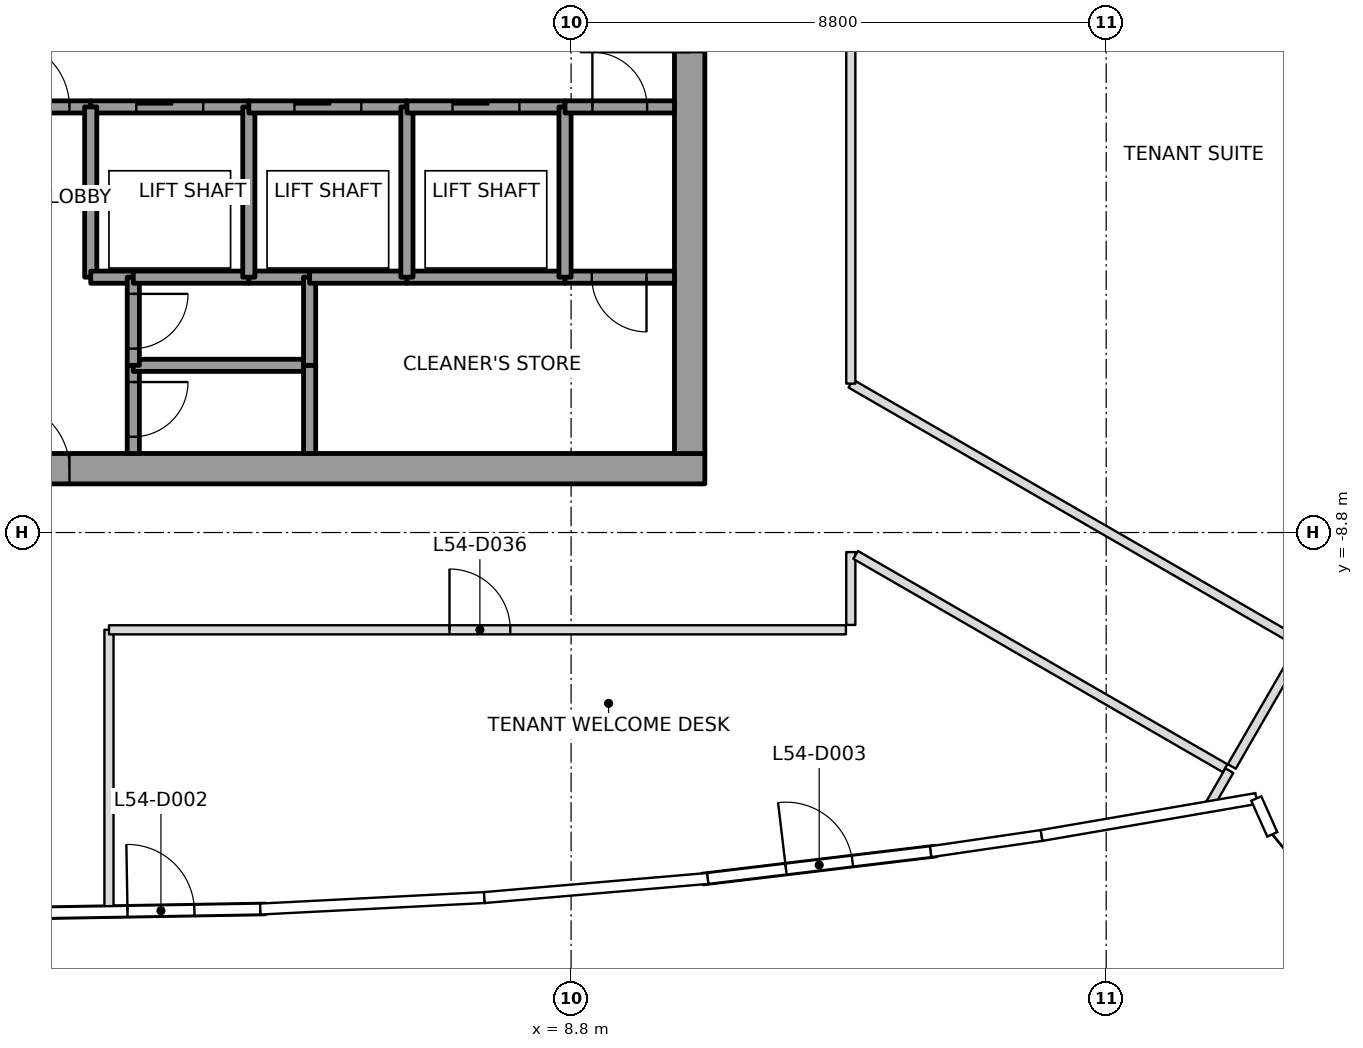
"""IFC4 building model, lengths in metres.
Left out: names, types, materials, properties, quantities, classifications, styles, units other than length and angle.
Written with IfcOpenShell. Run it as: python <this file> out.ifc"""

import sys

from ifc_helpers import new_model, si_unit, direction, frame, frame_2d, origin, place, context, subcontext, project, spatial, rectangle, extrude, element, fill, save


model = new_model("IFC4")
c1 = context("Model", 3, precision=1e-05, world=origin(), true_north=direction((0.0, 1.0)))
c2 = subcontext(c1, "Body", "Model", "MODEL_VIEW")
j1 = project(units=[si_unit("LENGTHUNIT", "METRE"), si_unit("PLANEANGLEUNIT", "RADIAN")], contexts=[c1])
p1 = place(None, origin())
s1 = spatial("IfcSite", under=j1, at=p1, CompositionType="ELEMENT")
p2 = place(p1, origin())
s2 = spatial("IfcBuilding", under=s1, at=p2, CompositionType="ELEMENT")
p3 = place(p2, frame((0.0, 0.0, 243.0)))
s3 = spatial("IfcBuildingStorey", under=s2, at=p3, CompositionType="ELEMENT", Elevation=243.0)
p4 = place(p3, frame((-11.0, -7.75, 0.0), z_axis=(0.0, 0.0, 1.0), x_axis=(1.0, 0.0, 0.0)))
e1 = element("IfcWall", 1, at=p4, inside=s3, PredefinedType="SHEAR", context=c2, shape_type="SweptSolid", body=[
    extrude(rectangle(XDim=22.0, YDim=0.5, at=frame_2d((11.0, 0.0))), origin(), (0.0, 0.0, 1.0), 4.0),
])
p5 = place(p4, frame((10.45, 0.0, 0.0)))
e2 = element("IfcOpeningElement", 2, at=p5, cuts=e1, PredefinedType="OPENING", context=c2, shape_type="SweptSolid", body=[
    extrude(rectangle(XDim=1.1, YDim=2.1, at=frame_2d((0.55, 1.05))), frame((0.0, 0.25, 0.0), z_axis=(0.0, -1.0, 0.0), x_axis=(1.0, 0.0, 0.0)), (0.0, 0.0, 1.0), 0.5),
])
p6 = place(p3, frame((10.75, -7.5, 0.0), z_axis=(0.0, 0.0, 1.0), x_axis=(0.0, 1.0, 0.0)))
e3 = element("IfcWall", 3, at=p6, inside=s3, PredefinedType="SHEAR", context=c2, shape_type="SweptSolid", body=[
    extrude(rectangle(XDim=15.0, YDim=0.5, at=frame_2d((7.5, 0.0))), origin(), (0.0, 0.0, 1.0), 4.0),
])
p7 = place(p6, frame((6.6, 0.0, 0.0)))
e4 = element("IfcOpeningElement", 4, at=p7, cuts=e3, PredefinedType="OPENING", context=c2, shape_type="SweptSolid", body=[
    extrude(rectangle(XDim=1.8, YDim=2.1, at=frame_2d((0.9, 1.05))), frame((0.0, 0.25, 0.0), z_axis=(0.0, -1.0, 0.0), x_axis=(1.0, 0.0, 0.0)), (0.0, 0.0, 1.0), 0.5),
])
p8 = place(p3, frame((-0.09, -15.057, 0.0), z_axis=(0.0, 0.0, 1.0), x_axis=(0.999853809474, 0.017098528577, 0.0)))
e5 = element("IfcWall", 5, at=p8, inside=s3, PredefinedType="SOLIDWALL", context=c2, shape_type="SweptSolid", body=[
    extrude(rectangle(XDim=3.869, YDim=0.2, at=frame_2d((1.935, 0.0))), origin(), (0.0, 0.0, 1.0), 3.317),
])
p9 = place(p8, frame((1.595, 0.0, 0.0)))
e6 = element("IfcOpeningElement", 6, at=p9, cuts=e5, PredefinedType="OPENING", context=c2, shape_type="SweptSolid", body=[
    extrude(rectangle(XDim=1.1, YDim=2.1, at=frame_2d((0.55, 1.05))), frame((0.0, 0.1, 0.0), z_axis=(0.0, -1.0, 0.0), x_axis=(1.0, 0.0, 0.0)), (0.0, 0.0, 1.0), 0.2),
])
p10 = place(p3, frame((10.96, -14.5, 0.0), z_axis=(0.0, 0.0, 1.0), x_axis=(0.992871762076, 0.119187516431, 0.0)))
e7 = element("IfcWall", 7, at=p10, inside=s3, PredefinedType="SOLIDWALL", context=c2, shape_type="SweptSolid", body=[
    extrude(rectangle(XDim=3.869, YDim=0.2, at=frame_2d((1.935, 0.0))), origin(), (0.0, 0.0, 1.0), 3.34),
])
p11 = place(p10, frame((1.385, 0.0, 0.0)))
e8 = element("IfcOpeningElement", 8, at=p11, cuts=e7, PredefinedType="OPENING", context=c2, shape_type="SweptSolid", body=[
    extrude(rectangle(XDim=1.1, YDim=2.1, at=frame_2d((0.55, 1.05))), frame((0.0, 0.1, 0.0), z_axis=(0.0, -1.0, 0.0), x_axis=(1.0, 0.0, 0.0)), (0.0, 0.0, 1.0), 0.2),
])
p12 = place(p3, frame((-0.9, -1.8, 0.0), z_axis=(0.0, 0.0, 1.0), x_axis=(1.0, 0.0, 0.0)))
e9 = element("IfcWall", 9, at=p12, inside=s3, PredefinedType="SOLIDWALL", context=c2, shape_type="SweptSolid", body=[
    extrude(rectangle(XDim=1.8, YDim=0.2, at=frame_2d((0.9, 0.0))), origin(), (0.0, 0.0, 1.0), 3.85),
])
p13 = place(p12, frame((0.35, 0.0, 0.0)))
e10 = element("IfcOpeningElement", 10, at=p13, cuts=e9, PredefinedType="OPENING", context=c2, shape_type="SweptSolid", body=[
    extrude(rectangle(XDim=1.1, YDim=2.1, at=frame_2d((0.55, 1.05))), frame((0.0, 0.1, 0.0), z_axis=(0.0, -1.0, 0.0), x_axis=(1.0, 0.0, 0.0)), (0.0, 0.0, 1.0), 0.2),
])
p14 = place(p3, frame((0.9, -1.8, 0.0), z_axis=(0.0, 0.0, 1.0), x_axis=(1.0, 0.0, 0.0)))
e11 = element("IfcWall", 11, at=p14, inside=s3, PredefinedType="SOLIDWALL", context=c2, shape_type="SweptSolid", body=[
    extrude(rectangle(XDim=2.6, YDim=0.2, at=frame_2d((1.3, 0.0))), origin(), (0.0, 0.0, 1.0), 3.85),
])
p15 = place(p14, frame((0.75, 0.0, 0.0)))
e12 = element("IfcOpeningElement", 12, at=p15, cuts=e11, PredefinedType="OPENING", context=c2, shape_type="SweptSolid", body=[
    extrude(rectangle(XDim=1.1, YDim=2.1, at=frame_2d((0.55, 1.05))), frame((0.0, 0.1, 0.0), z_axis=(0.0, -1.0, 0.0), x_axis=(1.0, 0.0, 0.0)), (0.0, 0.0, 1.0), 0.2),
])
p16 = place(p3, frame((0.9, -1.8, 0.0), z_axis=(0.0, 0.0, 1.0), x_axis=(0.0, -1.0, 0.0)))
e13 = element("IfcWall", 13, at=p16, inside=s3, PredefinedType="SOLIDWALL", context=c2, shape_type="SweptSolid", body=[
    extrude(rectangle(XDim=2.8, YDim=0.2, at=frame_2d((1.4, 0.0))), origin(), (0.0, 0.0, 1.0), 3.85),
])
p17 = place(p3, frame((0.9, -4.6, 0.0), z_axis=(0.0, 0.0, 1.0), x_axis=(1.0, 0.0, 0.0)))
e14 = element("IfcWall", 14, at=p17, inside=s3, PredefinedType="SOLIDWALL", context=c2, shape_type="SweptSolid", body=[
    extrude(rectangle(XDim=0.7, YDim=0.2, at=frame_2d((0.35, 0.0))), origin(), (0.0, 0.0, 1.0), 3.85),
])
p18 = place(p3, frame((1.6, -6.05, 0.0), z_axis=(0.0, 0.0, 1.0), x_axis=(0.0, -1.0, 0.0)))
e15 = element("IfcWall", 15, at=p18, inside=s3, PredefinedType="SOLIDWALL", context=c2, shape_type="SweptSolid", body=[
    extrude(rectangle(XDim=1.45, YDim=0.2, at=frame_2d((0.725, 0.0))), origin(), (0.0, 0.0, 1.0), 3.85),
])
p19 = place(p18, frame((0.275, 0.0, 0.0)))
e16 = element("IfcOpeningElement", 16, at=p19, cuts=e15, PredefinedType="OPENING", context=c2, shape_type="SweptSolid", body=[
    extrude(rectangle(XDim=0.9, YDim=2.1, at=frame_2d((0.45, 1.05))), frame((0.0, 0.1, 0.0), z_axis=(0.0, -1.0, 0.0), x_axis=(1.0, 0.0, 0.0)), (0.0, 0.0, 1.0), 0.2),
])
p20 = place(p3, frame((4.5, -6.05, 0.0), z_axis=(0.0, 0.0, 1.0), x_axis=(-1.0, 0.0, 0.0)))
e17 = element("IfcWall", 17, at=p20, inside=s3, PredefinedType="SOLIDWALL", context=c2, shape_type="SweptSolid", body=[
    extrude(rectangle(XDim=2.9, YDim=0.2, at=frame_2d((1.45, 0.0))), origin(), (0.0, 0.0, 1.0), 3.85),
])
p21 = place(p3, frame((1.6, -4.6, 0.0), z_axis=(0.0, 0.0, 1.0), x_axis=(0.0, -1.0, 0.0)))
e18 = element("IfcWall", 18, at=p21, inside=s3, PredefinedType="SOLIDWALL", context=c2, shape_type="SweptSolid", body=[
    extrude(rectangle(XDim=1.45, YDim=0.2, at=frame_2d((0.725, 0.0))), origin(), (0.0, 0.0, 1.0), 3.85),
])
p22 = place(p21, frame((0.275, 0.0, 0.0)))
e19 = element("IfcOpeningElement", 19, at=p22, cuts=e18, PredefinedType="OPENING", context=c2, shape_type="SweptSolid", body=[
    extrude(rectangle(XDim=0.9, YDim=2.1, at=frame_2d((0.45, 1.05))), frame((0.0, 0.1, 0.0), z_axis=(0.0, -1.0, 0.0), x_axis=(1.0, 0.0, 0.0)), (0.0, 0.0, 1.0), 0.2),
])
p23 = place(p3, frame((3.5, -4.6, 0.0), z_axis=(0.0, 0.0, 1.0), x_axis=(-1.0, 0.0, 0.0)))
e20 = element("IfcWall", 20, at=p23, inside=s3, PredefinedType="SOLIDWALL", context=c2, shape_type="SweptSolid", body=[
    extrude(rectangle(XDim=1.9, YDim=0.2, at=frame_2d((0.95, 0.0))), origin(), (0.0, 0.0, 1.0), 3.85),
])
p24 = place(p3, frame((4.5, -4.6, 0.0), z_axis=(0.0, 0.0, 1.0), x_axis=(-1.0, 0.0, 0.0)))
e21 = element("IfcWall", 21, at=p24, inside=s3, PredefinedType="SOLIDWALL", context=c2, shape_type="SweptSolid", body=[
    extrude(rectangle(XDim=1.0, YDim=0.2, at=frame_2d((0.5, 0.0))), origin(), (0.0, 0.0, 1.0), 3.85),
])
p25 = place(p3, frame((3.5, -4.6, 0.0), z_axis=(0.0, 0.0, 1.0), x_axis=(0.0, 1.0, 0.0)))
e22 = element("IfcWall", 22, at=p25, inside=s3, PredefinedType="SOLIDWALL", context=c2, shape_type="SweptSolid", body=[
    extrude(rectangle(XDim=2.8, YDim=0.2, at=frame_2d((1.4, 0.0))), origin(), (0.0, 0.0, 1.0), 3.85),
])
p26 = place(p3, frame((3.5, -1.8, 0.0), z_axis=(0.0, 0.0, 1.0), x_axis=(1.0, 0.0, 0.0)))
e23 = element("IfcWall", 23, at=p26, inside=s3, PredefinedType="SOLIDWALL", context=c2, shape_type="SweptSolid", body=[
    extrude(rectangle(XDim=2.6, YDim=0.2, at=frame_2d((1.3, 0.0))), origin(), (0.0, 0.0, 1.0), 3.85),
])
p27 = place(p26, frame((0.75, 0.0, 0.0)))
e24 = element("IfcOpeningElement", 24, at=p27, cuts=e23, PredefinedType="OPENING", context=c2, shape_type="SweptSolid", body=[
    extrude(rectangle(XDim=1.1, YDim=2.1, at=frame_2d((0.55, 1.05))), frame((0.0, 0.1, 0.0), z_axis=(0.0, -1.0, 0.0), x_axis=(1.0, 0.0, 0.0)), (0.0, 0.0, 1.0), 0.2),
])
for number, where, z_axis, x_axis in (
    (25, (4.5, -6.05, 0.0), (0.0, 0.0, 1.0), (0.0, -1.0, 0.0)),
    (26, (4.5, -4.6, 0.0), (0.0, 0.0, 1.0), (0.0, -1.0, 0.0)),
):
    element("IfcWall", number, at=place(p3, frame(where, z_axis=z_axis, x_axis=x_axis)), inside=s3, PredefinedType="SOLIDWALL", context=c2, shape_type="SweptSolid", body=[
        extrude(rectangle(XDim=1.45, YDim=0.2, at=frame_2d((0.725, 0.0))), origin(), (0.0, 0.0, 1.0), 3.85),
    ])
p28 = place(p3, frame((6.1, -4.6, 0.0), z_axis=(0.0, 0.0, 1.0), x_axis=(-1.0, 0.0, 0.0)))
e27 = element("IfcWall", 27, at=p28, inside=s3, PredefinedType="SOLIDWALL", context=c2, shape_type="SweptSolid", body=[
    extrude(rectangle(XDim=1.6, YDim=0.2, at=frame_2d((0.8, 0.0))), origin(), (0.0, 0.0, 1.0), 3.85),
])
p29 = place(p3, frame((8.7, -4.6, 0.0), z_axis=(0.0, 0.0, 1.0), x_axis=(-1.0, 0.0, 0.0)))
e28 = element("IfcWall", 28, at=p29, inside=s3, PredefinedType="SOLIDWALL", context=c2, shape_type="SweptSolid", body=[
    extrude(rectangle(XDim=2.6, YDim=0.2, at=frame_2d((1.3, 0.0))), origin(), (0.0, 0.0, 1.0), 3.85),
])
p30 = place(p3, frame((6.1, -4.6, 0.0), z_axis=(0.0, 0.0, 1.0), x_axis=(0.0, 1.0, 0.0)))
e29 = element("IfcWall", 29, at=p30, inside=s3, PredefinedType="SOLIDWALL", context=c2, shape_type="SweptSolid", body=[
    extrude(rectangle(XDim=2.8, YDim=0.2, at=frame_2d((1.4, 0.0))), origin(), (0.0, 0.0, 1.0), 3.85),
])
p31 = place(p3, frame((6.1, -1.8, 0.0), z_axis=(0.0, 0.0, 1.0), x_axis=(1.0, 0.0, 0.0)))
e30 = element("IfcWall", 30, at=p31, inside=s3, PredefinedType="SOLIDWALL", context=c2, shape_type="SweptSolid", body=[
    extrude(rectangle(XDim=2.6, YDim=0.2, at=frame_2d((1.3, 0.0))), origin(), (0.0, 0.0, 1.0), 3.85),
])
p32 = place(p31, frame((0.75, 0.0, 0.0)))
e31 = element("IfcOpeningElement", 31, at=p32, cuts=e30, PredefinedType="OPENING", context=c2, shape_type="SweptSolid", body=[
    extrude(rectangle(XDim=1.1, YDim=2.1, at=frame_2d((0.55, 1.05))), frame((0.0, 0.1, 0.0), z_axis=(0.0, -1.0, 0.0), x_axis=(1.0, 0.0, 0.0)), (0.0, 0.0, 1.0), 0.2),
])
p33 = place(p3, frame((10.5, -4.6, 0.0), z_axis=(0.0, 0.0, 1.0), x_axis=(-1.0, 0.0, 0.0)))
e32 = element("IfcWall", 32, at=p33, inside=s3, PredefinedType="SOLIDWALL", context=c2, shape_type="SweptSolid", body=[
    extrude(rectangle(XDim=1.8, YDim=0.2, at=frame_2d((0.9, 0.0))), origin(), (0.0, 0.0, 1.0), 3.85),
])
p34 = place(p33, frame((0.46, 0.0, 0.0)))
e33 = element("IfcOpeningElement", 33, at=p34, cuts=e32, PredefinedType="OPENING", context=c2, shape_type="SweptSolid", body=[
    extrude(rectangle(XDim=0.9, YDim=2.1, at=frame_2d((0.45, 1.05))), frame((0.0, 0.1, 0.0), z_axis=(0.0, -1.0, 0.0), x_axis=(1.0, 0.0, 0.0)), (0.0, 0.0, 1.0), 0.2),
])
p35 = place(p3, frame((8.7, -1.8, 0.0), z_axis=(0.0, 0.0, 1.0), x_axis=(0.0, -1.0, 0.0)))
e34 = element("IfcWall", 34, at=p35, inside=s3, PredefinedType="SOLIDWALL", context=c2, shape_type="SweptSolid", body=[
    extrude(rectangle(XDim=2.8, YDim=0.2, at=frame_2d((1.4, 0.0))), origin(), (0.0, 0.0, 1.0), 3.85),
])
p36 = place(p3, frame((8.7, -1.8, 0.0), z_axis=(0.0, 0.0, 1.0), x_axis=(1.0, 0.0, 0.0)))
e35 = element("IfcWall", 35, at=p36, inside=s3, PredefinedType="SOLIDWALL", context=c2, shape_type="SweptSolid", body=[
    extrude(rectangle(XDim=1.8, YDim=0.2, at=frame_2d((0.9, 0.0))), origin(), (0.0, 0.0, 1.0), 3.85),
])
p37 = place(p36, frame((0.45, 0.0, 0.0)))
e36 = element("IfcOpeningElement", 36, at=p37, cuts=e35, PredefinedType="OPENING", context=c2, shape_type="SweptSolid", body=[
    extrude(rectangle(XDim=0.9, YDim=2.1, at=frame_2d((0.45, 1.05))), frame((0.0, 0.1, 0.0), z_axis=(0.0, -1.0, 0.0), x_axis=(1.0, 0.0, 0.0)), (0.0, 0.0, 1.0), 0.2),
])
p38 = place(p3, frame((19.625, -12.717, 0.0), z_axis=(0.0, 0.0, 1.0), x_axis=(-0.499996383721, -0.866027491634, 0.0)))
e37 = element("IfcWall", 37, at=p38, inside=s3, PredefinedType="PARTITIONING", context=c2, shape_type="SweptSolid", body=[
    extrude(rectangle(XDim=0.694, YDim=0.15, at=frame_2d((0.347, 0.0))), origin(), (0.0, 0.0, 1.0), 3.45),
])
p39 = place(p3, frame((1.2, -15.045, 0.0), z_axis=(0.0, 0.0, 1.0), x_axis=(0.0, 1.0, 0.0)))
e38 = element("IfcWall", 38, at=p39, inside=s3, PredefinedType="PARTITIONING", context=c2, shape_type="SweptSolid", body=[
    extrude(rectangle(XDim=4.645, YDim=0.15, at=frame_2d((2.323, 0.0))), origin(), (0.0, 0.0, 1.0), 3.45),
])
p40 = place(p3, frame((1.2, -10.4, 0.0), z_axis=(0.0, 0.0, 1.0), x_axis=(1.0, 0.0, 0.0)))
e39 = element("IfcWall", 39, at=p40, inside=s3, PredefinedType="PARTITIONING", context=c2, shape_type="SweptSolid", body=[
    extrude(rectangle(XDim=12.12, YDim=0.15, at=frame_2d((6.06, 0.0))), origin(), (0.0, 0.0, 1.0), 3.317),
])
p41 = place(p40, frame((5.6, 0.0, 0.0)))
e40 = element("IfcOpeningElement", 40, at=p41, cuts=e39, PredefinedType="OPENING", context=c2, shape_type="SweptSolid", body=[
    extrude(rectangle(XDim=1.0, YDim=2.1, at=frame_2d((0.5, 1.05))), frame((0.0, 0.075, 0.0), z_axis=(0.0, -1.0, 0.0), x_axis=(1.0, 0.0, 0.0)), (0.0, 0.0, 1.0), 0.15),
])
p42 = place(p3, frame((13.4, -10.32, 0.0), z_axis=(0.0, 0.0, 1.0), x_axis=(0.0, 1.0, 0.0)))
e41 = element("IfcWall", 41, at=p42, inside=s3, PredefinedType="PARTITIONING", context=c2, shape_type="SweptSolid", body=[
    extrude(rectangle(XDim=1.198, YDim=0.15, at=frame_2d((0.599, 0.0))), origin(), (0.0, 0.0, 1.0), 3.233),
])
p43 = place(p3, frame((13.479, -9.168, 0.0), z_axis=(0.0, 0.0, 1.0), x_axis=(0.866031473494, -0.499989486807, 0.0)))
e42 = element("IfcWall", 42, at=p43, inside=s3, PredefinedType="PARTITIONING", context=c2, shape_type="SweptSolid", body=[
    extrude(rectangle(XDim=7.017, YDim=0.15, at=frame_2d((3.509, 0.0))), origin(), (0.0, 0.0, 1.0), 3.233),
])
p44 = place(p3, frame((20.756, -10.598, 0.0), z_axis=(0.0, 0.0, 1.0), x_axis=(-0.866034343295, 0.499984515995, 0.0)))
e43 = element("IfcWall", 43, at=p44, inside=s3, PredefinedType="PARTITIONING", context=c2, shape_type="SweptSolid", body=[
    extrude(rectangle(XDim=8.494, YDim=0.15, at=frame_2d((4.247, 0.0))), origin(), (0.0, 0.0, 1.0), 3.317),
])
p45 = place(p3, frame((13.4, -6.351, 0.0), z_axis=(0.0, 0.0, 1.0), x_axis=(0.0, 1.0, 0.0)))
e44 = element("IfcWall", 44, at=p45, inside=s3, PredefinedType="PARTITIONING", context=c2, shape_type="SweptSolid", body=[
    extrude(rectangle(XDim=12.702, YDim=0.15, at=frame_2d((6.351, 0.0))), origin(), (0.0, 0.0, 1.0), 3.317),
])
p46 = place(p45, frame((5.851, 0.0, 0.0)))
e45 = element("IfcOpeningElement", 45, at=p46, cuts=e44, PredefinedType="OPENING", context=c2, shape_type="SweptSolid", body=[
    extrude(rectangle(XDim=1.0, YDim=2.1, at=frame_2d((0.5, 1.05))), frame((0.0, 0.075, 0.0), z_axis=(0.0, -1.0, 0.0), x_axis=(1.0, 0.0, 0.0)), (0.0, 0.0, 1.0), 0.15),
])
p47 = place(p3, frame((19.666, -12.647, 0.0), z_axis=(0.0, 0.0, 1.0), x_axis=(0.500030632641, 0.866007717299, 0.0)))
e46 = element("IfcWall", 46, at=p47, inside=s3, PredefinedType="PARTITIONING", context=c2, shape_type="SweptSolid", body=[
    extrude(rectangle(XDim=2.24, YDim=0.15, at=frame_2d((1.12, 0.0))), origin(), (0.0, 0.0, 1.0), 3.233),
])
p48 = place(p9, origin())
e47 = element("IfcDoor", 47, at=p48, inside=s3, OperationType="SINGLE_SWING_LEFT", PredefinedType="DOOR", context=c2, shape_type="SweptSolid", body=[
    extrude(rectangle(XDim=1.1, YDim=2.1, at=frame_2d((0.55, 1.05))), frame((0.0, 0.025, 0.0), z_axis=(0.0, -1.0, 0.0), x_axis=(1.0, 0.0, 0.0)), (0.0, 0.0, 1.0), 0.05),
])
fill(e6, e47)
p49 = place(p11, origin())
e48 = element("IfcDoor", 48, at=p49, inside=s3, OperationType="SINGLE_SWING_RIGHT", PredefinedType="DOOR", context=c2, shape_type="SweptSolid", body=[
    extrude(rectangle(XDim=1.1, YDim=2.1, at=frame_2d((0.55, 1.05))), frame((0.0, 0.025, 0.0), z_axis=(0.0, -1.0, 0.0), x_axis=(1.0, 0.0, 0.0)), (0.0, 0.0, 1.0), 0.05),
])
fill(e8, e48)
p50 = place(p41, origin())
e49 = element("IfcDoor", 49, at=p50, inside=s3, OperationType="SINGLE_SWING_RIGHT", PredefinedType="DOOR", context=c2, shape_type="SweptSolid", body=[
    extrude(rectangle(XDim=1.0, YDim=2.1, at=frame_2d((0.5, 1.05))), frame((0.0, 0.025, 0.0), z_axis=(0.0, -1.0, 0.0), x_axis=(1.0, 0.0, 0.0)), (0.0, 0.0, 1.0), 0.05),
])
fill(e40, e49)
p51 = place(p15, origin())
e50 = element("IfcDoor", 50, at=p51, inside=s3, OperationType="SLIDING_TO_LEFT", PredefinedType="DOOR", context=c2, shape_type="SweptSolid", body=[
    extrude(rectangle(XDim=1.1, YDim=2.1, at=frame_2d((0.55, 1.05))), frame((0.0, 0.025, 0.0), z_axis=(0.0, -1.0, 0.0), x_axis=(1.0, 0.0, 0.0)), (0.0, 0.0, 1.0), 0.05),
])
fill(e12, e50)
p52 = place(p27, origin())
e51 = element("IfcDoor", 51, at=p52, inside=s3, OperationType="SLIDING_TO_LEFT", PredefinedType="DOOR", context=c2, shape_type="SweptSolid", body=[
    extrude(rectangle(XDim=1.1, YDim=2.1, at=frame_2d((0.55, 1.05))), frame((0.0, 0.025, 0.0), z_axis=(0.0, -1.0, 0.0), x_axis=(1.0, 0.0, 0.0)), (0.0, 0.0, 1.0), 0.05),
])
fill(e24, e51)
p53 = place(p32, origin())
e52 = element("IfcDoor", 52, at=p53, inside=s3, OperationType="SLIDING_TO_RIGHT", PredefinedType="DOOR", context=c2, shape_type="SweptSolid", body=[
    extrude(rectangle(XDim=1.1, YDim=2.1, at=frame_2d((0.55, 1.05))), frame((0.0, 0.025, 0.0), z_axis=(0.0, -1.0, 0.0), x_axis=(1.0, 0.0, 0.0)), (0.0, 0.0, 1.0), 0.05),
])
fill(e31, e52)
p54 = place(p13, origin())
e53 = element("IfcDoor", 53, at=p54, inside=s3, OperationType="SINGLE_SWING_LEFT", PredefinedType="DOOR", context=c2, shape_type="SweptSolid", body=[
    extrude(rectangle(XDim=1.1, YDim=2.1, at=frame_2d((0.55, 1.05))), frame((0.0, 0.025, 0.0), z_axis=(0.0, -1.0, 0.0), x_axis=(1.0, 0.0, 0.0)), (0.0, 0.0, 1.0), 0.05),
])
fill(e10, e53)
p55 = place(p34, origin())
e54 = element("IfcDoor", 54, at=p55, inside=s3, OperationType="SINGLE_SWING_RIGHT", PredefinedType="DOOR", context=c2, shape_type="SweptSolid", body=[
    extrude(rectangle(XDim=0.9, YDim=2.1, at=frame_2d((0.45, 1.05))), frame((0.0, 0.025, 0.0), z_axis=(0.0, -1.0, 0.0), x_axis=(1.0, 0.0, 0.0)), (0.0, 0.0, 1.0), 0.05),
])
fill(e33, e54)
p56 = place(p37, origin())
e55 = element("IfcDoor", 55, at=p56, inside=s3, OperationType="SINGLE_SWING_LEFT", PredefinedType="DOOR", context=c2, shape_type="SweptSolid", body=[
    extrude(rectangle(XDim=0.9, YDim=2.1, at=frame_2d((0.45, 1.05))), frame((0.0, 0.025, 0.0), z_axis=(0.0, -1.0, 0.0), x_axis=(1.0, 0.0, 0.0)), (0.0, 0.0, 1.0), 0.05),
])
fill(e36, e55)
p57 = place(p19, origin())
e56 = element("IfcDoor", 56, at=p57, inside=s3, OperationType="SINGLE_SWING_LEFT", PredefinedType="DOOR", context=c2, shape_type="SweptSolid", body=[
    extrude(rectangle(XDim=0.9, YDim=2.1, at=frame_2d((0.45, 1.05))), frame((0.0, 0.025, 0.0), z_axis=(0.0, -1.0, 0.0), x_axis=(1.0, 0.0, 0.0)), (0.0, 0.0, 1.0), 0.05),
])
fill(e16, e56)
p58 = place(p22, origin())
e57 = element("IfcDoor", 57, at=p58, inside=s3, OperationType="SINGLE_SWING_RIGHT", PredefinedType="DOOR", context=c2, shape_type="SweptSolid", body=[
    extrude(rectangle(XDim=0.9, YDim=2.1, at=frame_2d((0.45, 1.05))), frame((0.0, 0.025, 0.0), z_axis=(0.0, -1.0, 0.0), x_axis=(1.0, 0.0, 0.0)), (0.0, 0.0, 1.0), 0.05),
])
fill(e19, e57)
p59 = place(p7, origin())
e58 = element("IfcDoor", 58, at=p59, inside=s3, OperationType="DOUBLE_DOOR_SINGLE_SWING", PredefinedType="DOOR", context=c2, shape_type="SweptSolid", body=[
    extrude(rectangle(XDim=1.8, YDim=2.1, at=frame_2d((0.9, 1.05))), frame((0.0, 0.025, 0.0), z_axis=(0.0, -1.0, 0.0), x_axis=(1.0, 0.0, 0.0)), (0.0, 0.0, 1.0), 0.05),
])
fill(e4, e58)
p60 = place(p5, origin())
e59 = element("IfcDoor", 59, at=p60, inside=s3, OperationType="SINGLE_SWING_LEFT", PredefinedType="DOOR", context=c2, shape_type="SweptSolid", body=[
    extrude(rectangle(XDim=1.1, YDim=2.1, at=frame_2d((0.55, 1.05))), frame((0.0, 0.025, 0.0), z_axis=(0.0, -1.0, 0.0), x_axis=(1.0, 0.0, 0.0)), (0.0, 0.0, 1.0), 0.05),
])
fill(e2, e59)
save(model, sys.argv[1])
